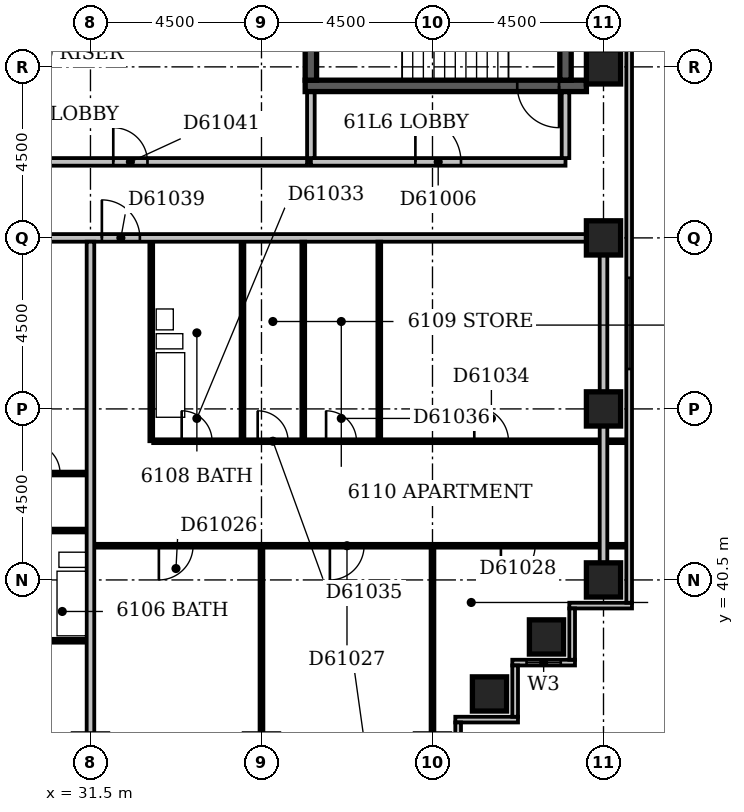
"""IFC4 building model, lengths in metres.
Left out: names, types, materials, properties, quantities, classifications, styles, units other than length and angle.
Written with IfcOpenShell. Run it as: python <this file> out.ifc"""

import sys

from ifc_helpers import new_model, si_unit, direction, frame, frame_2d, origin, origin_2d, place, context, subcontext, project, spatial, rectangle, extrude, element, fill, save


model = new_model("IFC4")
c1 = context("Model", 3, precision=1e-05, world=origin(), true_north=direction((0.0, 1.0)))
c2 = subcontext(c1, "Body", "Model", "MODEL_VIEW")
j1 = project(units=[si_unit("LENGTHUNIT", "METRE"), si_unit("PLANEANGLEUNIT", "RADIAN")], contexts=[c1])
p1 = place(None, origin())
s1 = spatial("IfcSite", under=j1, at=p1, CompositionType="ELEMENT")
p2 = place(p1, origin())
s2 = spatial("IfcBuilding", under=s1, at=p2, CompositionType="ELEMENT")
p3 = place(p2, frame((0.0, 0.0, 236.6)))
s3 = spatial("IfcBuildingStorey", under=s2, at=p3, CompositionType="ELEMENT", Elevation=236.6)
p4 = place(p3, frame((37.15, 53.5, -0.3), z_axis=(0.0, 0.0, 1.0), x_axis=(1.0, 0.0, 0.0)))
e1 = element("IfcWall", 1, at=p4, inside=s3, PredefinedType="SHEAR", context=c2, shape_type="SweptSolid", body=[
    extrude(rectangle(XDim=7.4, YDim=0.3, at=frame_2d((3.7, 0.0))), origin(), (0.0, 0.0, 1.0), 3.6),
])
p5 = place(p4, frame((5.58, 0.0, 0.3)))
e2 = element("IfcOpeningElement", 2, at=p5, cuts=e1, PredefinedType="OPENING", context=c2, shape_type="SweptSolid", body=[
    extrude(rectangle(XDim=1.1, YDim=2.1, at=frame_2d((0.55, 1.05))), frame((0.0, 0.162, 0.0), z_axis=(0.0, -1.0, 0.0), x_axis=(1.0, 0.0, 0.0)), (0.0, 0.0, 1.0), 0.324),
])
for number, where, z_axis, x_axis in (
    (3, (37.3, 53.65, -0.3), (0.0, 0.0, 1.0), (0.0, 1.0, 0.0)),
    (4, (44.0, 53.65, -0.3), (0.0, 0.0, 1.0), (0.0, 1.0, 0.0)),
):
    element("IfcWall", number, at=place(p3, frame(where, z_axis=z_axis, x_axis=x_axis)), inside=s3, PredefinedType="SHEAR", context=c2, shape_type="SweptSolid", body=[
        extrude(rectangle(XDim=4.2, YDim=0.3, at=frame_2d((2.1, 0.0))), origin(), (0.0, 0.0, 1.0), 3.6),
    ])
for number, where, z_axis, x_axis in (
    (5, (42.0, 37.5, -0.3), (0.0, 0.0, 1.0), (1.0, 0.0, 0.0)),
    (6, (43.5, 39.0, -0.3), (0.0, 0.0, 1.0), (1.0, 0.0, 0.0)),
    (7, (45.0, 40.5, -0.3), (0.0, 0.0, 1.0), (1.0, 0.0, 0.0)),
    (8, (45.0, 45.0, -0.3), (0.0, 0.0, 1.0), (1.0, 0.0, 0.0)),
    (9, (45.0, 49.5, -0.3), (0.0, 0.0, 1.0), (1.0, 0.0, 0.0)),
    (10, (45.0, 54.0, -0.3), (0.0, 0.0, 1.0), (1.0, 0.0, 0.0)),
):
    element("IfcColumn", number, at=place(p3, frame(where, z_axis=z_axis, x_axis=x_axis)), inside=s3, PredefinedType="COLUMN", context=c2, shape_type="SweptSolid", body=[
        extrude(rectangle(XDim=0.9, YDim=0.9, at=origin_2d()), origin(), (0.0, 0.0, 1.0), 3.6),
    ])
p6 = place(p3, frame((41.175, 35.4, 0.0), z_axis=(0.0, 0.0, 1.0), x_axis=(0.0, 1.0, 0.0)))
e11 = element("IfcWall", 11, at=p6, inside=s3, PredefinedType="STANDARD", context=c2, shape_type="SweptSolid", body=[
    extrude(rectangle(XDim=1.35, YDim=0.15, at=frame_2d((0.675, 0.0))), origin(), (0.0, 0.0, 1.0), 2.7),
])
p7 = place(p3, frame((41.1, 36.825, 0.0), z_axis=(0.0, 0.0, 1.0), x_axis=(1.0, 0.0, 0.0)))
e12 = element("IfcWall", 12, at=p7, inside=s3, PredefinedType="STANDARD", context=c2, shape_type="SweptSolid", body=[
    extrude(rectangle(XDim=1.65, YDim=0.15, at=frame_2d((0.825, 0.0))), origin(), (0.0, 0.0, 1.0), 2.7),
])
p8 = place(p3, frame((42.675, 36.9, 0.0), z_axis=(0.0, 0.0, 1.0), x_axis=(0.0, 1.0, 0.0)))
e13 = element("IfcWall", 13, at=p8, inside=s3, PredefinedType="STANDARD", context=c2, shape_type="SweptSolid", body=[
    extrude(rectangle(XDim=1.35, YDim=0.15, at=frame_2d((0.675, 0.0))), origin(), (0.0, 0.0, 1.0), 2.7),
])
p9 = place(p3, frame((42.6, 38.325, 0.0), z_axis=(0.0, 0.0, 1.0), x_axis=(1.0, 0.0, 0.0)))
e14 = element("IfcWall", 14, at=p9, inside=s3, PredefinedType="STANDARD", context=c2, shape_type="SweptSolid", body=[
    extrude(rectangle(XDim=1.65, YDim=0.15, at=frame_2d((0.825, 0.0))), origin(), (0.0, 0.0, 1.0), 2.7),
])
p10 = place(p9, frame((0.375, 0.0, 0.6)))
e15 = element("IfcOpeningElement", 15, at=p10, cuts=e14, PredefinedType="OPENING", context=c2, shape_type="SweptSolid", body=[
    extrude(rectangle(XDim=0.9, YDim=1.8, at=frame_2d((0.45, 0.9))), frame((0.0, 0.087, 0.0), z_axis=(0.0, -1.0, 0.0), x_axis=(1.0, 0.0, 0.0)), (0.0, 0.0, 1.0), 0.174),
])
p11 = place(p3, frame((44.175, 38.4, 0.0), z_axis=(0.0, 0.0, 1.0), x_axis=(0.0, 1.0, 0.0)))
e16 = element("IfcWall", 16, at=p11, inside=s3, PredefinedType="STANDARD", context=c2, shape_type="SweptSolid", body=[
    extrude(rectangle(XDim=1.35, YDim=0.15, at=frame_2d((0.675, 0.0))), origin(), (0.0, 0.0, 1.0), 2.7),
])
p12 = place(p3, frame((44.1, 39.825, 0.0), z_axis=(0.0, 0.0, 1.0), x_axis=(1.0, 0.0, 0.0)))
e17 = element("IfcWall", 17, at=p12, inside=s3, PredefinedType="STANDARD", context=c2, shape_type="SweptSolid", body=[
    extrude(rectangle(XDim=1.65, YDim=0.15, at=frame_2d((0.825, 0.0))), origin(), (0.0, 0.0, 1.0), 2.7),
])
p13 = place(p3, frame((45.675, 39.9, 0.0), z_axis=(0.0, 0.0, 1.0), x_axis=(0.0, 1.0, 0.0)))
e18 = element("IfcWall", 18, at=p13, inside=s3, PredefinedType="STANDARD", context=c2, shape_type="SweptSolid", body=[
    extrude(rectangle(XDim=19.35, YDim=0.15, at=frame_2d((9.675, 0.0))), origin(), (0.0, 0.0, 1.0), 2.7),
])
p14 = place(p13, frame((6.15, 0.0, 0.6)))
e19 = element("IfcOpeningElement", 19, at=p14, cuts=e18, PredefinedType="OPENING", context=c2, shape_type="SweptSolid", body=[
    extrude(rectangle(XDim=2.4, YDim=1.8, at=frame_2d((1.2, 0.9))), frame((0.0, 0.087, 0.0), z_axis=(0.0, -1.0, 0.0), x_axis=(1.0, 0.0, 0.0)), (0.0, 0.0, 1.0), 0.174),
])
p15 = place(p3, frame((37.3, 51.5, 0.0), z_axis=(0.0, 0.0, 1.0), x_axis=(1.0, 0.0, 0.0)))
e20 = element("IfcWall", 20, at=p15, inside=s3, PredefinedType="PARTITIONING", context=c2, shape_type="SweptSolid", body=[
    extrude(rectangle(XDim=6.7, YDim=0.2, at=frame_2d((3.35, 0.0))), origin(), (0.0, 0.0, 1.0), 3.3),
])
p16 = place(p15, frame((2.75, 0.0, 0.0)))
e21 = element("IfcOpeningElement", 21, at=p16, cuts=e20, PredefinedType="OPENING", context=c2, shape_type="SweptSolid", body=[
    extrude(rectangle(XDim=1.2, YDim=2.1, at=frame_2d((0.6, 1.05))), frame((0.0, 0.112, 0.0), z_axis=(0.0, -1.0, 0.0), x_axis=(1.0, 0.0, 0.0)), (0.0, 0.0, 1.0), 0.224),
])
for number, where, z_axis, x_axis in (
    (22, (44.0, 51.6, 0.0), (0.0, 0.0, 1.0), (0.0, 1.0, 0.0)),
    (23, (37.3, 51.6, 0.0), (0.0, 0.0, 1.0), (0.0, 1.0, 0.0)),
):
    element("IfcWall", number, at=place(p3, frame(where, z_axis=z_axis, x_axis=x_axis)), inside=s3, PredefinedType="PARTITIONING", context=c2, shape_type="SweptSolid", body=[
        extrude(rectangle(XDim=1.73, YDim=0.2, at=frame_2d((0.865, 0.0))), origin(), (0.0, 0.0, 1.0), 3.3),
    ])
p17 = place(p3, frame((31.5, 36.45, 0.0), z_axis=(0.0, 0.0, 1.0), x_axis=(0.0, 1.0, 0.0)))
e24 = element("IfcWall", 24, at=p17, inside=s3, PredefinedType="PARTITIONING", context=c2, shape_type="SweptSolid", body=[
    extrude(rectangle(XDim=12.95, YDim=0.2, at=frame_2d((6.475, 0.0))), origin(), (0.0, 0.0, 1.0), 3.3),
])
for number, where, z_axis, x_axis in (
    (25, (36.0, 36.45, 0.0), (0.0, 0.0, 1.0), (0.0, 1.0, 0.0)),
    (26, (40.5, 36.45, 0.0), (0.0, 0.0, 1.0), (0.0, 1.0, 0.0)),
):
    element("IfcWall", number, at=place(p3, frame(where, z_axis=z_axis, x_axis=x_axis)), inside=s3, PredefinedType="PARTITIONING", context=c2, shape_type="SweptSolid", body=[
        extrude(rectangle(XDim=4.9, YDim=0.1, at=frame_2d((2.45, 0.0))), origin(), (0.0, 0.0, 1.0), 3.3),
    ])
p18 = place(p3, frame((29.25, 38.9, 0.0), z_axis=(0.0, 0.0, 1.0), x_axis=(1.0, 0.0, 0.0)))
e27 = element("IfcWall", 27, at=p18, inside=s3, PredefinedType="PLUMBINGWALL", context=c2, shape_type="SweptSolid", body=[
    extrude(rectangle(XDim=2.15, YDim=0.1, at=frame_2d((1.075, 0.0))), origin(), (0.0, 0.0, 1.0), 3.3),
])
p19 = place(p3, frame((45.0, 40.95, 0.0), z_axis=(0.0, 0.0, 1.0), x_axis=(0.0, 1.0, 0.0)))
e28 = element("IfcWall", 28, at=p19, inside=s3, PredefinedType="PARTITIONING", context=c2, shape_type="SweptSolid", body=[
    extrude(rectangle(XDim=8.1, YDim=0.2, at=frame_2d((4.05, 0.0))), origin(), (0.0, 0.0, 1.0), 2.7),
])
p20 = place(p3, frame((31.6, 41.4, 0.0), z_axis=(0.0, 0.0, 1.0), x_axis=(1.0, 0.0, 0.0)))
e29 = element("IfcWall", 29, at=p20, inside=s3, PredefinedType="PARTITIONING", context=c2, shape_type="SweptSolid", body=[
    extrude(rectangle(XDim=14.0, YDim=0.1, at=frame_2d((7.0, 0.0))), origin(), (0.0, 0.0, 1.0), 3.3),
])
p21 = place(p20, frame((1.7, 0.0, 0.0)))
e30 = element("IfcOpeningElement", 30, at=p21, cuts=e29, PredefinedType="OPENING", context=c2, shape_type="SweptSolid", body=[
    extrude(rectangle(XDim=0.9, YDim=2.1, at=frame_2d((0.45, 1.05))), frame((0.0, 0.062, 0.0), z_axis=(0.0, -1.0, 0.0), x_axis=(1.0, 0.0, 0.0)), (0.0, 0.0, 1.0), 0.124),
])
p22 = place(p20, frame((6.2, 0.0, 0.0)))
e31 = element("IfcOpeningElement", 31, at=p22, cuts=e29, PredefinedType="OPENING", context=c2, shape_type="SweptSolid", body=[
    extrude(rectangle(XDim=0.9, YDim=2.1, at=frame_2d((0.45, 1.05))), frame((0.0, 0.062, 0.0), z_axis=(0.0, -1.0, 0.0), x_axis=(1.0, 0.0, 0.0)), (0.0, 0.0, 1.0), 0.124),
])
p23 = place(p20, frame((10.7, 0.0, 0.0)))
e32 = element("IfcOpeningElement", 32, at=p23, cuts=e29, PredefinedType="OPENING", context=c2, shape_type="SweptSolid", body=[
    extrude(rectangle(XDim=0.9, YDim=2.1, at=frame_2d((0.45, 1.05))), frame((0.0, 0.062, 0.0), z_axis=(0.0, -1.0, 0.0), x_axis=(1.0, 0.0, 0.0)), (0.0, 0.0, 1.0), 0.124),
])
p24 = place(p3, frame((22.6, 41.8, 0.0), z_axis=(0.0, 0.0, 1.0), x_axis=(1.0, 0.0, 0.0)))
e33 = element("IfcWall", 33, at=p24, inside=s3, PredefinedType="PARTITIONING", context=c2, shape_type="SweptSolid", body=[
    extrude(rectangle(XDim=8.8, YDim=0.1, at=frame_2d((4.4, 0.0))), origin(), (0.0, 0.0, 1.0), 3.3),
])
p25 = place(p24, frame((1.7, 0.0, 0.0)))
e34 = element("IfcOpeningElement", 34, at=p25, cuts=e33, PredefinedType="OPENING", context=c2, shape_type="SweptSolid", body=[
    extrude(rectangle(XDim=0.9, YDim=2.1, at=frame_2d((0.45, 1.05))), frame((0.0, 0.062, 0.0), z_axis=(0.0, -1.0, 0.0), x_axis=(1.0, 0.0, 0.0)), (0.0, 0.0, 1.0), 0.124),
])
p26 = place(p24, frame((5.05, 0.0, 0.0)))
e35 = element("IfcOpeningElement", 35, at=p26, cuts=e33, PredefinedType="OPENING", context=c2, shape_type="SweptSolid", body=[
    extrude(rectangle(XDim=0.9, YDim=2.1, at=frame_2d((0.45, 1.05))), frame((0.0, 0.062, 0.0), z_axis=(0.0, -1.0, 0.0), x_axis=(1.0, 0.0, 0.0)), (0.0, 0.0, 1.0), 0.124),
])
p27 = place(p3, frame((29.15, 43.3, 0.0), z_axis=(0.0, 0.0, 1.0), x_axis=(1.0, 0.0, 0.0)))
e36 = element("IfcWall", 36, at=p27, inside=s3, PredefinedType="PARTITIONING", context=c2, shape_type="SweptSolid", body=[
    extrude(rectangle(XDim=2.25, YDim=0.1, at=frame_2d((1.125, 0.0))), origin(), (0.0, 0.0, 1.0), 3.3),
])
p28 = place(p27, frame((0.75, 0.0, 0.0)))
e37 = element("IfcOpeningElement", 37, at=p28, cuts=e36, PredefinedType="OPENING", context=c2, shape_type="SweptSolid", body=[
    extrude(rectangle(XDim=0.8, YDim=2.1, at=frame_2d((0.4, 1.05))), frame((0.0, 0.062, 0.0), z_axis=(0.0, -1.0, 0.0), x_axis=(1.0, 0.0, 0.0)), (0.0, 0.0, 1.0), 0.124),
])
p29 = place(p3, frame((33.1, 44.15, 0.0), z_axis=(0.0, 0.0, 1.0), x_axis=(0.0, 1.0, 0.0)))
e38 = element("IfcWall", 38, at=p29, inside=s3, PredefinedType="PLUMBINGWALL", context=c2, shape_type="SweptSolid", body=[
    extrude(rectangle(XDim=5.25, YDim=0.1, at=frame_2d((2.625, 0.0))), origin(), (0.0, 0.0, 1.0), 3.3),
])
p30 = place(p3, frame((33.15, 44.15, 0.0), z_axis=(0.0, 0.0, 1.0), x_axis=(1.0, 0.0, 0.0)))
e39 = element("IfcWall", 39, at=p30, inside=s3, PredefinedType="PARTITIONING", context=c2, shape_type="SweptSolid", body=[
    extrude(rectangle(XDim=12.45, YDim=0.1, at=frame_2d((6.225, 0.0))), origin(), (0.0, 0.0, 1.0), 3.3),
])
p31 = place(p30, frame((0.75, 0.0, 0.0)))
e40 = element("IfcOpeningElement", 40, at=p31, cuts=e39, PredefinedType="OPENING", context=c2, shape_type="SweptSolid", body=[
    extrude(rectangle(XDim=0.8, YDim=2.1, at=frame_2d((0.4, 1.05))), frame((0.0, 0.062, 0.0), z_axis=(0.0, -1.0, 0.0), x_axis=(1.0, 0.0, 0.0)), (0.0, 0.0, 1.0), 0.124),
])
p32 = place(p30, frame((8.45, 0.0, 0.0)))
e41 = element("IfcOpeningElement", 41, at=p32, cuts=e39, PredefinedType="OPENING", context=c2, shape_type="SweptSolid", body=[
    extrude(rectangle(XDim=0.9, YDim=2.1, at=frame_2d((0.45, 1.05))), frame((0.0, 0.062, 0.0), z_axis=(0.0, -1.0, 0.0), x_axis=(1.0, 0.0, 0.0)), (0.0, 0.0, 1.0), 0.124),
])
p33 = place(p30, frame((2.75, 0.0, 0.0)))
e42 = element("IfcOpeningElement", 42, at=p33, cuts=e39, PredefinedType="OPENING", context=c2, shape_type="SweptSolid", body=[
    extrude(rectangle(XDim=0.8, YDim=2.1, at=frame_2d((0.4, 1.05))), frame((0.0, 0.062, 0.0), z_axis=(0.0, -1.0, 0.0), x_axis=(1.0, 0.0, 0.0)), (0.0, 0.0, 1.0), 0.124),
])
p34 = place(p30, frame((4.55, 0.0, 0.0)))
e43 = element("IfcOpeningElement", 43, at=p34, cuts=e39, PredefinedType="OPENING", context=c2, shape_type="SweptSolid", body=[
    extrude(rectangle(XDim=0.8, YDim=2.1, at=frame_2d((0.4, 1.05))), frame((0.0, 0.062, 0.0), z_axis=(0.0, -1.0, 0.0), x_axis=(1.0, 0.0, 0.0)), (0.0, 0.0, 1.0), 0.124),
])
p35 = place(p3, frame((35.5, 44.2, 0.0), z_axis=(0.0, 0.0, 1.0), x_axis=(0.0, 1.0, 0.0)))
e44 = element("IfcWall", 44, at=p35, inside=s3, PredefinedType="PLUMBINGWALL", context=c2, shape_type="SweptSolid", body=[
    extrude(rectangle(XDim=5.2, YDim=0.1, at=frame_2d((2.6, 0.0))), origin(), (0.0, 0.0, 1.0), 3.3),
])
for number, where, z_axis, x_axis in (
    (45, (37.1, 44.2, 0.0), (0.0, 0.0, 1.0), (0.0, 1.0, 0.0)),
    (46, (39.1, 44.2, 0.0), (0.0, 0.0, 1.0), (0.0, 1.0, 0.0)),
):
    element("IfcWall", number, at=place(p3, frame(where, z_axis=z_axis, x_axis=x_axis)), inside=s3, PredefinedType="PARTITIONING", context=c2, shape_type="SweptSolid", body=[
        extrude(rectangle(XDim=5.2, YDim=0.1, at=frame_2d((2.6, 0.0))), origin(), (0.0, 0.0, 1.0), 3.3),
    ])
p36 = place(p3, frame((22.6, 49.5, 0.0), z_axis=(0.0, 0.0, 1.0), x_axis=(1.0, 0.0, 0.0)))
e47 = element("IfcWall", 47, at=p36, inside=s3, PredefinedType="PARTITIONING", context=c2, shape_type="SweptSolid", body=[
    extrude(rectangle(XDim=21.95, YDim=0.2, at=frame_2d((10.975, 0.0))), origin(), (0.0, 0.0, 1.0), 3.3),
])
p37 = place(p36, frame((5.2, 0.0, 0.0)))
e48 = element("IfcOpeningElement", 48, at=p37, cuts=e47, PredefinedType="OPENING", context=c2, shape_type="SweptSolid", body=[
    extrude(rectangle(XDim=1.0, YDim=2.1, at=frame_2d((0.5, 1.05))), frame((0.0, 0.112, 0.0), z_axis=(0.0, -1.0, 0.0), x_axis=(1.0, 0.0, 0.0)), (0.0, 0.0, 1.0), 0.224),
])
p38 = place(p36, frame((9.2, 0.0, 0.0)))
e49 = element("IfcOpeningElement", 49, at=p38, cuts=e47, PredefinedType="OPENING", context=c2, shape_type="SweptSolid", body=[
    extrude(rectangle(XDim=1.0, YDim=2.1, at=frame_2d((0.5, 1.05))), frame((0.0, 0.112, 0.0), z_axis=(0.0, -1.0, 0.0), x_axis=(1.0, 0.0, 0.0)), (0.0, 0.0, 1.0), 0.224),
])
p39 = place(p3, frame((27.9, 51.5, 0.0), z_axis=(0.0, 0.0, 1.0), x_axis=(1.0, 0.0, 0.0)))
e50 = element("IfcWall", 50, at=p39, inside=s3, PredefinedType="PARTITIONING", context=c2, shape_type="SweptSolid", body=[
    extrude(rectangle(XDim=9.3, YDim=0.2, at=frame_2d((4.65, 0.0))), origin(), (0.0, 0.0, 1.0), 3.3),
])
p40 = place(p39, frame((4.2, 0.0, 0.0)))
e51 = element("IfcOpeningElement", 51, at=p40, cuts=e50, PredefinedType="OPENING", context=c2, shape_type="SweptSolid", body=[
    extrude(rectangle(XDim=0.9, YDim=2.1, at=frame_2d((0.45, 1.05))), frame((0.0, 0.112, 0.0), z_axis=(0.0, -1.0, 0.0), x_axis=(1.0, 0.0, 0.0)), (0.0, 0.0, 1.0), 0.224),
])
p41 = place(p14, origin())
e52 = element("IfcWindow", 52, at=p41, inside=s3, PartitioningType="SINGLE_PANEL", PredefinedType="WINDOW", context=c2, shape_type="SweptSolid", body=[
    extrude(rectangle(XDim=2.4, YDim=1.8, at=frame_2d((1.2, 0.9))), frame((0.0, 0.03, 0.0), z_axis=(0.0, -1.0, 0.0), x_axis=(1.0, 0.0, 0.0)), (0.0, 0.0, 1.0), 0.06),
])
fill(e19, e52)
p42 = place(p10, origin())
e53 = element("IfcWindow", 53, at=p42, inside=s3, PartitioningType="SINGLE_PANEL", PredefinedType="WINDOW", context=c2, shape_type="SweptSolid", body=[
    extrude(rectangle(XDim=0.9, YDim=1.8, at=frame_2d((0.45, 0.9))), frame((0.0, 0.03, 0.0), z_axis=(0.0, -1.0, 0.0), x_axis=(1.0, 0.0, 0.0)), (0.0, 0.0, 1.0), 0.06),
])
fill(e15, e53)
p43 = place(p16, origin())
e54 = element("IfcDoor", 54, at=p43, inside=s3, OperationType="SINGLE_SWING_LEFT", PredefinedType="DOOR", context=c2, shape_type="SweptSolid", body=[
    extrude(rectangle(XDim=1.2, YDim=2.1, at=frame_2d((0.6, 1.05))), frame((0.0, 0.025, 0.0), z_axis=(0.0, -1.0, 0.0), x_axis=(1.0, 0.0, 0.0)), (0.0, 0.0, 1.0), 0.05),
])
fill(e21, e54)
p44 = place(p5, origin())
e55 = element("IfcDoor", 55, at=p44, inside=s3, OperationType="SINGLE_SWING_RIGHT", PredefinedType="DOOR", context=c2, shape_type="SweptSolid", body=[
    extrude(rectangle(XDim=1.1, YDim=2.1, at=frame_2d((0.55, 1.05))), frame((0.0, 0.025, 0.0), z_axis=(0.0, -1.0, 0.0), x_axis=(1.0, 0.0, 0.0)), (0.0, 0.0, 1.0), 0.05),
])
fill(e2, e55)
p45 = place(p21, frame((0.9, 0.0, 0.0), z_axis=(0.0, 0.0, 1.0), x_axis=(-1.0, 0.0, 0.0)))
e56 = element("IfcDoor", 56, at=p45, inside=s3, OperationType="SINGLE_SWING_RIGHT", PredefinedType="DOOR", context=c2, shape_type="SweptSolid", body=[
    extrude(rectangle(XDim=0.9, YDim=2.1, at=frame_2d((0.45, 1.05))), frame((0.0, 0.025, 0.0), z_axis=(0.0, -1.0, 0.0), x_axis=(1.0, 0.0, 0.0)), (0.0, 0.0, 1.0), 0.05),
])
fill(e30, e56)
p46 = place(p22, frame((0.9, 0.0, 0.0), z_axis=(0.0, 0.0, 1.0), x_axis=(-1.0, 0.0, 0.0)))
e57 = element("IfcDoor", 57, at=p46, inside=s3, OperationType="SINGLE_SWING_RIGHT", PredefinedType="DOOR", context=c2, shape_type="SweptSolid", body=[
    extrude(rectangle(XDim=0.9, YDim=2.1, at=frame_2d((0.45, 1.05))), frame((0.0, 0.025, 0.0), z_axis=(0.0, -1.0, 0.0), x_axis=(1.0, 0.0, 0.0)), (0.0, 0.0, 1.0), 0.05),
])
fill(e31, e57)
p47 = place(p23, frame((0.9, 0.0, 0.0), z_axis=(0.0, 0.0, 1.0), x_axis=(-1.0, 0.0, 0.0)))
e58 = element("IfcDoor", 58, at=p47, inside=s3, OperationType="SINGLE_SWING_RIGHT", PredefinedType="DOOR", context=c2, shape_type="SweptSolid", body=[
    extrude(rectangle(XDim=0.9, YDim=2.1, at=frame_2d((0.45, 1.05))), frame((0.0, 0.025, 0.0), z_axis=(0.0, -1.0, 0.0), x_axis=(1.0, 0.0, 0.0)), (0.0, 0.0, 1.0), 0.05),
])
fill(e32, e58)
p48 = place(p28, origin())
e59 = element("IfcDoor", 59, at=p48, inside=s3, OperationType="SINGLE_SWING_LEFT", PredefinedType="DOOR", context=c2, shape_type="SweptSolid", body=[
    extrude(rectangle(XDim=0.8, YDim=2.1, at=frame_2d((0.4, 1.05))), frame((0.0, 0.025, 0.0), z_axis=(0.0, -1.0, 0.0), x_axis=(1.0, 0.0, 0.0)), (0.0, 0.0, 1.0), 0.05),
])
fill(e37, e59)
p49 = place(p31, origin())
e60 = element("IfcDoor", 60, at=p49, inside=s3, OperationType="SINGLE_SWING_LEFT", PredefinedType="DOOR", context=c2, shape_type="SweptSolid", body=[
    extrude(rectangle(XDim=0.8, YDim=2.1, at=frame_2d((0.4, 1.05))), frame((0.0, 0.025, 0.0), z_axis=(0.0, -1.0, 0.0), x_axis=(1.0, 0.0, 0.0)), (0.0, 0.0, 1.0), 0.05),
])
fill(e40, e60)
p50 = place(p32, origin())
e61 = element("IfcDoor", 61, at=p50, inside=s3, OperationType="SINGLE_SWING_LEFT", PredefinedType="DOOR", context=c2, shape_type="SweptSolid", body=[
    extrude(rectangle(XDim=0.9, YDim=2.1, at=frame_2d((0.45, 1.05))), frame((0.0, 0.025, 0.0), z_axis=(0.0, -1.0, 0.0), x_axis=(1.0, 0.0, 0.0)), (0.0, 0.0, 1.0), 0.05),
])
fill(e41, e61)
p51 = place(p33, origin())
e62 = element("IfcDoor", 62, at=p51, inside=s3, OperationType="SINGLE_SWING_LEFT", PredefinedType="DOOR", context=c2, shape_type="SweptSolid", body=[
    extrude(rectangle(XDim=0.8, YDim=2.1, at=frame_2d((0.4, 1.05))), frame((0.0, 0.025, 0.0), z_axis=(0.0, -1.0, 0.0), x_axis=(1.0, 0.0, 0.0)), (0.0, 0.0, 1.0), 0.05),
])
fill(e42, e62)
p52 = place(p34, origin())
e63 = element("IfcDoor", 63, at=p52, inside=s3, OperationType="SINGLE_SWING_LEFT", PredefinedType="DOOR", context=c2, shape_type="SweptSolid", body=[
    extrude(rectangle(XDim=0.8, YDim=2.1, at=frame_2d((0.4, 1.05))), frame((0.0, 0.025, 0.0), z_axis=(0.0, -1.0, 0.0), x_axis=(1.0, 0.0, 0.0)), (0.0, 0.0, 1.0), 0.05),
])
fill(e43, e63)
p53 = place(p38, origin())
e64 = element("IfcDoor", 64, at=p53, inside=s3, OperationType="SINGLE_SWING_LEFT", PredefinedType="DOOR", context=c2, shape_type="SweptSolid", body=[
    extrude(rectangle(XDim=1.0, YDim=2.1, at=frame_2d((0.5, 1.05))), frame((0.0, 0.025, 0.0), z_axis=(0.0, -1.0, 0.0), x_axis=(1.0, 0.0, 0.0)), (0.0, 0.0, 1.0), 0.05),
])
fill(e49, e64)
p54 = place(p40, origin())
e65 = element("IfcDoor", 65, at=p54, inside=s3, OperationType="SINGLE_SWING_LEFT", PredefinedType="DOOR", context=c2, shape_type="SweptSolid", body=[
    extrude(rectangle(XDim=0.9, YDim=2.1, at=frame_2d((0.45, 1.05))), frame((0.0, 0.025, 0.0), z_axis=(0.0, -1.0, 0.0), x_axis=(1.0, 0.0, 0.0)), (0.0, 0.0, 1.0), 0.05),
])
fill(e51, e65)
save(model, sys.argv[1])
